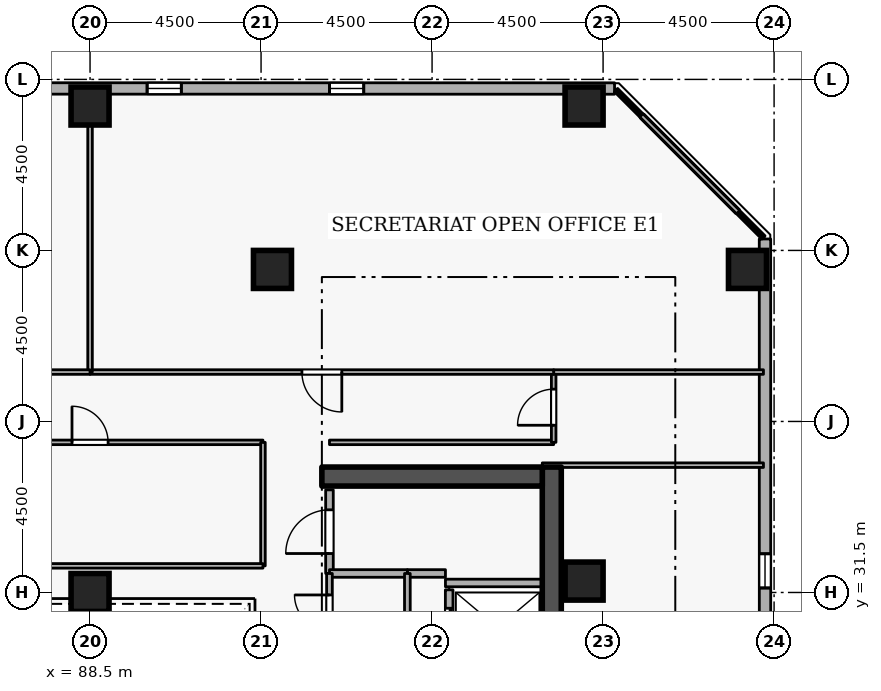
"""IFC4 building model, lengths in metres.
Left out: names, types, materials, properties, quantities, classifications, styles, units other than length and angle.
Written with IfcOpenShell. Run it as: python <this file> out.ifc"""

import sys

from ifc_helpers import new_model, si_unit, direction, frame, frame_2d, origin, origin_2d, place, context, subcontext, project, spatial, rectangle, extrude, element, fill, save


model = new_model("IFC4")
c1 = context("Model", 3, precision=1e-05, world=origin(), true_north=direction((0.0, 1.0)))
c2 = subcontext(c1, "Body", "Model", "MODEL_VIEW")
j1 = project(units=[si_unit("LENGTHUNIT", "METRE"), si_unit("PLANEANGLEUNIT", "RADIAN")], contexts=[c1])
p1 = place(None, origin())
s1 = spatial("IfcSite", under=j1, at=p1, CompositionType="ELEMENT")
p2 = place(p1, origin())
s2 = spatial("IfcBuilding", under=s1, at=p2, CompositionType="ELEMENT")
p3 = place(p2, frame((0.0, 0.0, 203.7)))
s3 = spatial("IfcBuildingStorey", under=s2, at=p3, CompositionType="ELEMENT", Elevation=203.7)
p4 = place(p3, frame((100.65, 19.2, 0.0), z_axis=(0.0, 0.0, 1.0), x_axis=(0.0, 1.0, 0.0)))
e1 = element("IfcWall", 1, at=p4, inside=s3, PredefinedType="SHEAR", context=c2, shape_type="SweptSolid", body=[
    extrude(rectangle(XDim=15.6, YDim=0.5, at=frame_2d((7.8, 0.0))), origin(), (0.0, 0.0, 1.0), 3.6),
])
p5 = place(p3, frame((94.6, 34.55, 0.0), z_axis=(0.0, 0.0, 1.0), x_axis=(1.0, 0.0, 0.0)))
e2 = element("IfcWall", 2, at=p5, inside=s3, PredefinedType="SHEAR", context=c2, shape_type="SweptSolid", body=[
    extrude(rectangle(XDim=5.8, YDim=0.5, at=frame_2d((2.9, 0.0))), origin(), (0.0, 0.0, 1.0), 3.6),
])
for number, where, z_axis, x_axis in (
    (3, (105.8, 40.0, 0.0), (0.0, 0.0, 1.0), (1.0, 0.0, 0.0)),
    (4, (101.5, 44.3, 0.0), (0.0, 0.0, 1.0), (1.0, 0.0, 0.0)),
    (5, (88.5, 44.3, 0.0), (0.0, 0.0, 1.0), (1.0, 0.0, 0.0)),
    (6, (93.3, 40.0, 0.0), (0.0, 0.0, 1.0), (1.0, 0.0, 0.0)),
    (7, (101.5, 31.8, 0.0), (0.0, 0.0, 1.0), (1.0, 0.0, 0.0)),
    (8, (88.5, 31.5, 0.0), (0.0, 0.0, 1.0), (1.0, 0.0, 0.0)),
):
    element("IfcColumn", number, at=place(p3, frame(where, z_axis=z_axis, x_axis=x_axis)), inside=s3, PredefinedType="COLUMN", context=c2, shape_type="SweptSolid", body=[
        extrude(rectangle(XDim=1.0, YDim=1.0, at=origin_2d()), origin(), (0.0, 0.0, 1.0), 3.6),
    ])
p6 = place(p3, frame((106.265, 5.819, 0.0), z_axis=(0.0, 0.0, 1.0), x_axis=(-0.000132597301, 0.999999991209, 0.0)))
e9 = element("IfcWall", 9, at=p6, inside=s3, PredefinedType="STANDARD", context=c2, shape_type="SweptSolid", body=[
    extrude(rectangle(XDim=34.983, YDim=0.3, at=frame_2d((17.492, 0.0))), origin(), (0.0, 0.0, 1.0), 2.7),
])
p7 = place(p6, frame((1.8, 0.0, 0.72)))
e10 = element("IfcOpeningElement", 10, at=p7, cuts=e9, PredefinedType="OPENING", context=c2, shape_type="SweptSolid", body=[
    extrude(rectangle(XDim=0.9, YDim=1.75, at=frame_2d((0.45, 0.875))), frame((0.0, 0.16, 0.0), z_axis=(0.0, -1.0, 0.0), x_axis=(1.0, 0.0, 0.0)), (0.0, 0.0, 1.0), 0.32),
])
p8 = place(p6, frame((11.4, 0.0, 0.72)))
e11 = element("IfcOpeningElement", 11, at=p8, cuts=e9, PredefinedType="OPENING", context=c2, shape_type="SweptSolid", body=[
    extrude(rectangle(XDim=0.9, YDim=1.75, at=frame_2d((0.45, 0.875))), frame((0.0, 0.16, 0.0), z_axis=(0.0, -1.0, 0.0), x_axis=(1.0, 0.0, 0.0)), (0.0, 0.0, 1.0), 0.32),
])
p9 = place(p6, frame((16.2, 0.0, 0.72)))
e12 = element("IfcOpeningElement", 12, at=p9, cuts=e9, PredefinedType="OPENING", context=c2, shape_type="SweptSolid", body=[
    extrude(rectangle(XDim=0.9, YDim=1.75, at=frame_2d((0.45, 0.875))), frame((0.0, 0.16, 0.0), z_axis=(0.0, -1.0, 0.0), x_axis=(1.0, 0.0, 0.0)), (0.0, 0.0, 1.0), 0.32),
])
p10 = place(p6, frame((25.8, 0.0, 0.72)))
e13 = element("IfcOpeningElement", 13, at=p10, cuts=e9, PredefinedType="OPENING", context=c2, shape_type="SweptSolid", body=[
    extrude(rectangle(XDim=0.9, YDim=1.75, at=frame_2d((0.45, 0.875))), frame((0.0, 0.16, 0.0), z_axis=(0.0, -1.0, 0.0), x_axis=(1.0, 0.0, 0.0)), (0.0, 0.0, 1.0), 0.32),
])
p11 = place(p3, frame((102.302, 44.76, 0.0), z_axis=(0.0, 0.0, 1.0), x_axis=(-0.999999991209, 0.000132597301, 0.0)))
e14 = element("IfcWall", 14, at=p11, inside=s3, PredefinedType="STANDARD", context=c2, shape_type="SweptSolid", body=[
    extrude(rectangle(XDim=34.983, YDim=0.3, at=frame_2d((17.492, 0.0))), origin(), (0.0, 0.0, 1.0), 2.7),
])
p12 = place(p11, frame((6.6, 0.0, 0.72)))
e15 = element("IfcOpeningElement", 15, at=p12, cuts=e14, PredefinedType="OPENING", context=c2, shape_type="SweptSolid", body=[
    extrude(rectangle(XDim=0.9, YDim=1.75, at=frame_2d((0.45, 0.875))), frame((0.0, 0.16, 0.0), z_axis=(0.0, -1.0, 0.0), x_axis=(1.0, 0.0, 0.0)), (0.0, 0.0, 1.0), 0.32),
])
p13 = place(p11, frame((11.4, 0.0, 0.72)))
e16 = element("IfcOpeningElement", 16, at=p13, cuts=e14, PredefinedType="OPENING", context=c2, shape_type="SweptSolid", body=[
    extrude(rectangle(XDim=0.9, YDim=1.75, at=frame_2d((0.45, 0.875))), frame((0.0, 0.16, 0.0), z_axis=(0.0, -1.0, 0.0), x_axis=(1.0, 0.0, 0.0)), (0.0, 0.0, 1.0), 0.32),
])
p14 = place(p11, frame((16.2, 0.0, 0.72)))
e17 = element("IfcOpeningElement", 17, at=p14, cuts=e14, PredefinedType="OPENING", context=c2, shape_type="SweptSolid", body=[
    extrude(rectangle(XDim=0.9, YDim=1.75, at=frame_2d((0.45, 0.875))), frame((0.0, 0.16, 0.0), z_axis=(0.0, -1.0, 0.0), x_axis=(1.0, 0.0, 0.0)), (0.0, 0.0, 1.0), 0.32),
])
p15 = place(p11, frame((21.0, 0.0, 0.72)))
e18 = element("IfcOpeningElement", 18, at=p15, cuts=e14, PredefinedType="OPENING", context=c2, shape_type="SweptSolid", body=[
    extrude(rectangle(XDim=0.9, YDim=1.75, at=frame_2d((0.45, 0.875))), frame((0.0, 0.16, 0.0), z_axis=(0.0, -1.0, 0.0), x_axis=(1.0, 0.0, 0.0)), (0.0, 0.0, 1.0), 0.32),
])
p16 = place(p11, frame((30.6, 0.0, 0.72)))
e19 = element("IfcOpeningElement", 19, at=p16, cuts=e14, PredefinedType="OPENING", context=c2, shape_type="SweptSolid", body=[
    extrude(rectangle(XDim=0.9, YDim=1.75, at=frame_2d((0.45, 0.875))), frame((0.0, 0.16, 0.0), z_axis=(0.0, -1.0, 0.0), x_axis=(1.0, 0.0, 0.0)), (0.0, 0.0, 1.0), 0.32),
])
p17 = place(p3, frame((97.95, 31.57, 0.0), z_axis=(0.0, 0.0, 1.0), x_axis=(0.0, -1.0, 0.0)))
e20 = element("IfcWall", 20, at=p17, inside=s3, PredefinedType="STANDARD", context=c2, shape_type="SweptSolid", body=[
    extrude(rectangle(XDim=1.99, YDim=0.2, at=frame_2d((0.995, 0.0))), origin(), (0.0, 0.0, 1.0), 3.34),
])
p18 = place(p17, frame((0.485, 0.0, 0.0)))
e21 = element("IfcOpeningElement", 21, at=p18, cuts=e20, PredefinedType="OPENING", context=c2, shape_type="SweptSolid", body=[
    extrude(rectangle(XDim=1.02, YDim=2.06, at=frame_2d((0.51, 1.03))), frame((0.0, 0.11, 0.0), z_axis=(0.0, -1.0, 0.0), x_axis=(1.0, 0.0, 0.0)), (0.0, 0.0, 1.0), 0.22),
])
p19 = place(p3, frame((97.852, 31.75, 0.0), z_axis=(0.0, 0.0, 1.0), x_axis=(1.0, 0.0, 0.0)))
e22 = element("IfcWall", 22, at=p19, inside=s3, PredefinedType="STANDARD", context=c2, shape_type="SweptSolid", body=[
    extrude(rectangle(XDim=2.536, YDim=0.2, at=frame_2d((1.268, 0.0))), origin(), (0.0, 0.0, 1.0), 3.34),
])
p20 = place(p3, frame((94.8, 32.0, 0.0), z_axis=(0.0, 0.0, 1.0), x_axis=(0.0, 1.0, 0.0)))
e23 = element("IfcWall", 23, at=p20, inside=s3, PredefinedType="STANDARD", context=c2, shape_type="SweptSolid", body=[
    extrude(rectangle(XDim=2.2, YDim=0.2, at=frame_2d((1.1, 0.0))), origin(), (0.0, 0.0, 1.0), 3.34),
])
p21 = place(p20, frame((0.525, 0.0, 0.0)))
e24 = element("IfcOpeningElement", 24, at=p21, cuts=e23, PredefinedType="OPENING", context=c2, shape_type="SweptSolid", body=[
    extrude(rectangle(XDim=1.15, YDim=2.1, at=frame_2d((0.575, 1.05))), frame((0.0, 0.11, 0.0), z_axis=(0.0, -1.0, 0.0), x_axis=(1.0, 0.0, 0.0)), (0.0, 0.0, 1.0), 0.22),
])
p22 = place(p3, frame((97.852, 32.0, 0.0), z_axis=(0.0, 0.0, 1.0), x_axis=(-1.0, 0.0, 0.0)))
e25 = element("IfcWall", 25, at=p22, inside=s3, PredefinedType="STANDARD", context=c2, shape_type="SweptSolid", body=[
    extrude(rectangle(XDim=1.002, YDim=0.2, at=frame_2d((0.501, 0.0))), origin(), (0.0, 0.0, 1.0), 3.34),
])
p23 = place(p3, frame((96.85, 32.0, 0.0), z_axis=(0.0, 0.0, 1.0), x_axis=(-1.0, 0.0, 0.0)))
e26 = element("IfcWall", 26, at=p23, inside=s3, PredefinedType="STANDARD", context=c2, shape_type="SweptSolid", body=[
    extrude(rectangle(XDim=2.05, YDim=0.2, at=frame_2d((1.025, 0.0))), origin(), (0.0, 0.0, 1.0), 3.34),
])
p24 = place(p3, frame((94.8, 29.95, 0.0), z_axis=(0.0, 0.0, 1.0), x_axis=(0.0, 1.0, 0.0)))
e27 = element("IfcWall", 27, at=p24, inside=s3, PredefinedType="PARTITIONING", context=c2, shape_type="SweptSolid", body=[
    extrude(rectangle(XDim=2.05, YDim=0.15, at=frame_2d((1.025, 0.0))), origin(), (0.0, 0.0, 1.0), 3.34),
])
p25 = place(p24, frame((0.565, 0.0, 0.0)))
e28 = element("IfcOpeningElement", 28, at=p25, cuts=e27, PredefinedType="OPENING", context=c2, shape_type="SweptSolid", body=[
    extrude(rectangle(XDim=0.92, YDim=2.08, at=frame_2d((0.46, 1.04))), frame((0.0, 0.085, 0.0), z_axis=(0.0, -1.0, 0.0), x_axis=(1.0, 0.0, 0.0)), (0.0, 0.0, 1.0), 0.17),
])
p26 = place(p3, frame((96.85, 32.0, 0.0), z_axis=(0.0, 0.0, 1.0), x_axis=(0.0, -1.0, 0.0)))
e29 = element("IfcWall", 29, at=p26, inside=s3, PredefinedType="PARTITIONING", context=c2, shape_type="SweptSolid", body=[
    extrude(rectangle(XDim=2.05, YDim=0.15, at=frame_2d((1.025, 0.0))), origin(), (0.0, 0.0, 1.0), 3.34),
])
p27 = place(p3, frame((94.8, 35.45, 0.0), z_axis=(0.0, 0.0, 1.0), x_axis=(1.0, 0.0, 0.0)))
e30 = element("IfcWall", 30, at=p27, inside=s3, PredefinedType="PARTITIONING", context=c2, shape_type="SweptSolid", body=[
    extrude(rectangle(XDim=5.9, YDim=0.12, at=frame_2d((2.95, 0.0))), origin(), (0.0, 0.0, 1.0), 3.34),
])
p28 = place(p3, frame((100.7, 35.45, 0.0), z_axis=(0.0, 0.0, 1.0), x_axis=(0.0, 1.0, 0.0)))
e31 = element("IfcWall", 31, at=p28, inside=s3, PredefinedType="PARTITIONING", context=c2, shape_type="SweptSolid", body=[
    extrude(rectangle(XDim=1.85, YDim=0.12, at=frame_2d((0.925, 0.0))), origin(), (0.0, 0.0, 1.0), 3.34),
])
p29 = place(p28, frame((0.45, 0.0, 0.0)))
e32 = element("IfcOpeningElement", 32, at=p29, cuts=e31, PredefinedType="OPENING", context=c2, shape_type="SweptSolid", body=[
    extrude(rectangle(XDim=0.95, YDim=2.1, at=frame_2d((0.475, 1.05))), frame((0.0, 0.07, 0.0), z_axis=(0.0, -1.0, 0.0), x_axis=(1.0, 0.0, 0.0)), (0.0, 0.0, 1.0), 0.14),
])
p30 = place(p3, frame((100.7, 37.3, 0.0), z_axis=(0.0, 0.0, 1.0), x_axis=(1.0, 0.0, 0.0)))
e33 = element("IfcWall", 33, at=p30, inside=s3, PredefinedType="PARTITIONING", context=c2, shape_type="SweptSolid", body=[
    extrude(rectangle(XDim=5.52, YDim=0.12, at=frame_2d((2.76, 0.0))), origin(), (0.0, 0.0, 1.0), 3.34),
])
p31 = place(p3, frame((106.22, 34.85, 0.0), z_axis=(0.0, 0.0, 1.0), x_axis=(-1.0, 0.0, 0.0)))
e34 = element("IfcWall", 34, at=p31, inside=s3, PredefinedType="PARTITIONING", context=c2, shape_type="SweptSolid", body=[
    extrude(rectangle(XDim=5.82, YDim=0.12, at=frame_2d((2.91, 0.0))), origin(), (0.0, 0.0, 1.0), 2.545),
])
p32 = place(p3, frame((100.7, 37.3, 0.0), z_axis=(0.0, 0.0, 1.0), x_axis=(-1.0, 0.0, 0.0)))
e35 = element("IfcWall", 35, at=p32, inside=s3, PredefinedType="PARTITIONING", context=c2, shape_type="SweptSolid", body=[
    extrude(rectangle(XDim=12.2, YDim=0.12, at=frame_2d((6.1, 0.0))), origin(), (0.0, 0.0, 1.0), 3.34),
])
p33 = place(p32, frame((5.575, 0.0, 0.0)))
e36 = element("IfcOpeningElement", 36, at=p33, cuts=e35, PredefinedType="OPENING", context=c2, shape_type="SweptSolid", body=[
    extrude(rectangle(XDim=1.05, YDim=2.1, at=frame_2d((0.525, 1.05))), frame((0.0, 0.07, 0.0), z_axis=(0.0, -1.0, 0.0), x_axis=(1.0, 0.0, 0.0)), (0.0, 0.0, 1.0), 0.14),
])
p34 = place(p3, frame((88.5, 37.3, 0.0), z_axis=(0.0, 0.0, 1.0), x_axis=(0.0, 1.0, 0.0)))
e37 = element("IfcWall", 37, at=p34, inside=s3, PredefinedType="PARTITIONING", context=c2, shape_type="SweptSolid", body=[
    extrude(rectangle(XDim=7.42, YDim=0.12, at=frame_2d((3.71, 0.0))), origin(), (0.0, 0.0, 1.0), 2.932),
])
p35 = place(p3, frame((102.34, 44.72, 0.0), z_axis=(0.0, 0.0, 1.0), x_axis=(0.707106781187, -0.707106781187, 0.0)))
e38 = element("IfcWall", 38, at=p35, inside=s3, PredefinedType="PARTITIONING", context=c2, shape_type="SweptSolid", body=[
    extrude(rectangle(XDim=5.487, YDim=0.12, at=frame_2d((2.743, 0.0))), origin(), (0.0, 0.0, 1.0), 3.34),
])
p36 = place(p3, frame((88.5, 37.3, 0.0), z_axis=(0.0, 0.0, 1.0), x_axis=(-1.0, 0.0, 0.0)))
e39 = element("IfcWall", 39, at=p36, inside=s3, PredefinedType="PARTITIONING", context=c2, shape_type="SweptSolid", body=[
    extrude(rectangle(XDim=6.3, YDim=0.12, at=frame_2d((3.15, 0.0))), origin(), (0.0, 0.0, 1.0), 3.34),
])
p37 = place(p36, frame((2.625, 0.0, 0.0)))
e40 = element("IfcOpeningElement", 40, at=p37, cuts=e39, PredefinedType="OPENING", context=c2, shape_type="SweptSolid", body=[
    extrude(rectangle(XDim=1.05, YDim=2.1, at=frame_2d((0.525, 1.05))), frame((0.0, 0.07, 0.0), z_axis=(0.0, -1.0, 0.0), x_axis=(1.0, 0.0, 0.0)), (0.0, 0.0, 1.0), 0.14),
])
p38 = place(p3, frame((83.95, 35.45, 0.0), z_axis=(0.0, 0.0, 1.0), x_axis=(1.0, 0.0, 0.0)))
e41 = element("IfcWall", 41, at=p38, inside=s3, PredefinedType="PARTITIONING", context=c2, shape_type="SweptSolid", body=[
    extrude(rectangle(XDim=9.1, YDim=0.12, at=frame_2d((4.55, 0.0))), origin(), (0.0, 0.0, 1.0), 3.34),
])
p39 = place(p38, frame((4.075, 0.0, 0.0)))
e42 = element("IfcOpeningElement", 42, at=p39, cuts=e41, PredefinedType="OPENING", context=c2, shape_type="SweptSolid", body=[
    extrude(rectangle(XDim=0.95, YDim=2.1, at=frame_2d((0.475, 1.05))), frame((0.0, 0.07, 0.0), z_axis=(0.0, -1.0, 0.0), x_axis=(1.0, 0.0, 0.0)), (0.0, 0.0, 1.0), 0.14),
])
p40 = place(p3, frame((93.05, 35.45, 0.0), z_axis=(0.0, 0.0, 1.0), x_axis=(0.0, -1.0, 0.0)))
e43 = element("IfcWall", 43, at=p40, inside=s3, PredefinedType="PARTITIONING", context=c2, shape_type="SweptSolid", body=[
    extrude(rectangle(XDim=3.25, YDim=0.12, at=frame_2d((1.625, 0.0))), origin(), (0.0, 0.0, 1.0), 3.34),
])
p41 = place(p3, frame((93.05, 32.2, 0.0), z_axis=(0.0, 0.0, 1.0), x_axis=(-1.0, 0.0, 0.0)))
e44 = element("IfcWall", 44, at=p41, inside=s3, PredefinedType="PARTITIONING", context=c2, shape_type="SweptSolid", body=[
    extrude(rectangle(XDim=9.1, YDim=0.12, at=frame_2d((4.55, 0.0))), origin(), (0.0, 0.0, 1.0), 3.34),
])
p42 = place(p10, origin())
e45 = element("IfcWindow", 45, at=p42, inside=s3, PartitioningType="SINGLE_PANEL", PredefinedType="WINDOW", context=c2, shape_type="SweptSolid", body=[
    extrude(rectangle(XDim=0.9, YDim=1.75, at=frame_2d((0.45, 0.875))), frame((0.0, 0.03, 0.0), z_axis=(0.0, -1.0, 0.0), x_axis=(1.0, 0.0, 0.0)), (0.0, 0.0, 1.0), 0.06),
])
fill(e13, e45)
p43 = place(p12, origin())
e46 = element("IfcWindow", 46, at=p43, inside=s3, PartitioningType="SINGLE_PANEL", PredefinedType="WINDOW", context=c2, shape_type="SweptSolid", body=[
    extrude(rectangle(XDim=0.9, YDim=1.75, at=frame_2d((0.45, 0.875))), frame((0.0, 0.03, 0.0), z_axis=(0.0, -1.0, 0.0), x_axis=(1.0, 0.0, 0.0)), (0.0, 0.0, 1.0), 0.06),
])
fill(e15, e46)
p44 = place(p13, origin())
e47 = element("IfcWindow", 47, at=p44, inside=s3, PartitioningType="SINGLE_PANEL", PredefinedType="WINDOW", context=c2, shape_type="SweptSolid", body=[
    extrude(rectangle(XDim=0.9, YDim=1.75, at=frame_2d((0.45, 0.875))), frame((0.0, 0.03, 0.0), z_axis=(0.0, -1.0, 0.0), x_axis=(1.0, 0.0, 0.0)), (0.0, 0.0, 1.0), 0.06),
])
fill(e16, e47)
p45 = place(p18, origin())
e48 = element("IfcDoor", 48, at=p45, inside=s3, OperationType="SLIDING_TO_LEFT", PredefinedType="DOOR", context=c2, shape_type="SweptSolid", body=[
    extrude(rectangle(XDim=1.02, YDim=2.06, at=frame_2d((0.51, 1.03))), frame((0.0, 0.025, 0.0), z_axis=(0.0, -1.0, 0.0), x_axis=(1.0, 0.0, 0.0)), (0.0, 0.0, 1.0), 0.05),
])
fill(e21, e48)
p46 = place(p25, origin())
e49 = element("IfcDoor", 49, at=p46, inside=s3, OperationType="SINGLE_SWING_RIGHT", PredefinedType="DOOR", context=c2, shape_type="SweptSolid", body=[
    extrude(rectangle(XDim=0.92, YDim=2.08, at=frame_2d((0.46, 1.04))), frame((0.0, 0.025, 0.0), z_axis=(0.0, -1.0, 0.0), x_axis=(1.0, 0.0, 0.0)), (0.0, 0.0, 1.0), 0.05),
])
fill(e28, e49)
p47 = place(p21, origin())
e50 = element("IfcDoor", 50, at=p47, inside=s3, OperationType="SINGLE_SWING_LEFT", PredefinedType="DOOR", context=c2, shape_type="SweptSolid", body=[
    extrude(rectangle(XDim=1.15, YDim=2.1, at=frame_2d((0.575, 1.05))), frame((0.0, 0.025, 0.0), z_axis=(0.0, -1.0, 0.0), x_axis=(1.0, 0.0, 0.0)), (0.0, 0.0, 1.0), 0.05),
])
fill(e24, e50)
p48 = place(p29, origin())
e51 = element("IfcDoor", 51, at=p48, inside=s3, OperationType="SINGLE_SWING_LEFT", PredefinedType="DOOR", context=c2, shape_type="SweptSolid", body=[
    extrude(rectangle(XDim=0.95, YDim=2.1, at=frame_2d((0.475, 1.05))), frame((0.0, 0.025, 0.0), z_axis=(0.0, -1.0, 0.0), x_axis=(1.0, 0.0, 0.0)), (0.0, 0.0, 1.0), 0.05),
])
fill(e32, e51)
p49 = place(p33, origin())
e52 = element("IfcDoor", 52, at=p49, inside=s3, OperationType="SINGLE_SWING_LEFT", PredefinedType="DOOR", context=c2, shape_type="SweptSolid", body=[
    extrude(rectangle(XDim=1.05, YDim=2.1, at=frame_2d((0.525, 1.05))), frame((0.0, 0.025, 0.0), z_axis=(0.0, -1.0, 0.0), x_axis=(1.0, 0.0, 0.0)), (0.0, 0.0, 1.0), 0.05),
])
fill(e36, e52)
p50 = place(p39, origin())
e53 = element("IfcDoor", 53, at=p50, inside=s3, OperationType="SINGLE_SWING_LEFT", PredefinedType="DOOR", context=c2, shape_type="SweptSolid", body=[
    extrude(rectangle(XDim=0.95, YDim=2.1, at=frame_2d((0.475, 1.05))), frame((0.0, 0.025, 0.0), z_axis=(0.0, -1.0, 0.0), x_axis=(1.0, 0.0, 0.0)), (0.0, 0.0, 1.0), 0.05),
])
fill(e42, e53)
save(model, sys.argv[1])
